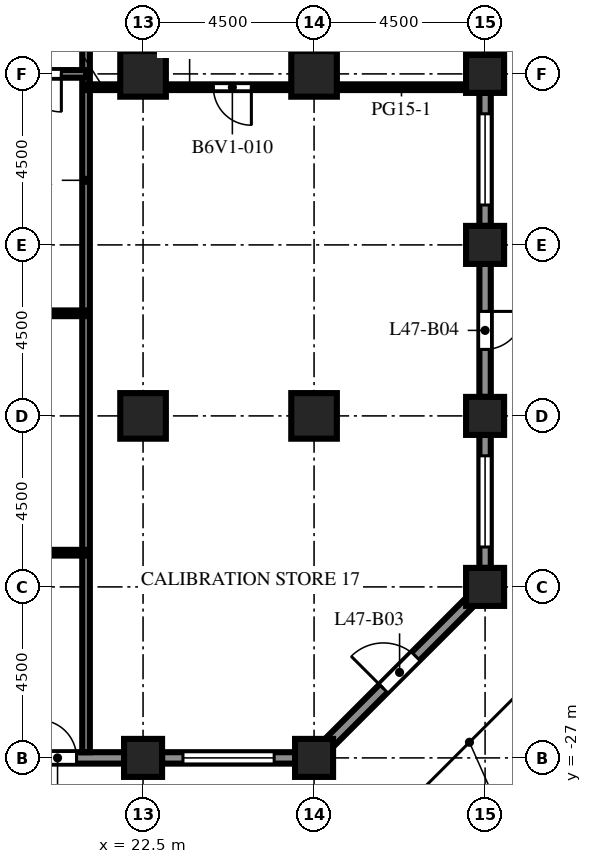
"""IFC4 building model, lengths in metres.
Left out: names, types, materials, properties, quantities, classifications, styles, units other than length and angle.
Written with IfcOpenShell. Run it as: python <this file> out.ifc"""

import sys

from ifc_helpers import new_model, si_unit, direction, frame, frame_2d, origin, origin_2d, place, context, subcontext, project, spatial, rectangle, extrude, element, fill, save


model = new_model("IFC4")
c1 = context("Model", 3, precision=1e-05, world=origin(), true_north=direction((0.0, 1.0)))
c2 = subcontext(c1, "Body", "Model", "MODEL_VIEW")
j1 = project(units=[si_unit("LENGTHUNIT", "METRE"), si_unit("PLANEANGLEUNIT", "RADIAN")], contexts=[c1])
p1 = place(None, origin())
s1 = spatial("IfcSite", under=j1, at=p1, CompositionType="ELEMENT")
p2 = place(p1, origin())
s2 = spatial("IfcBuilding", under=s1, at=p2, CompositionType="ELEMENT")
p3 = place(p2, frame((0.0, 0.0, 207.9)))
s3 = spatial("IfcBuildingStorey", under=s2, at=p3, CompositionType="ELEMENT", Elevation=207.9)
for number, where, z_axis, x_axis in (
    (1, (22.5, -27.0, 0.0), (0.0, 0.0, 1.0), (1.0, 0.0, 0.0)),
    (2, (27.0, -27.0, 0.0), (0.0, 0.0, 1.0), (1.0, 0.0, 0.0)),
    (3, (31.5, -22.5, 0.0), (0.0, 0.0, 1.0), (1.0, 0.0, 0.0)),
    (4, (31.5, -18.0, 0.0), (0.0, 0.0, 1.0), (1.0, 0.0, 0.0)),
    (5, (31.5, -13.5, 0.0), (0.0, 0.0, 1.0), (1.0, 0.0, 0.0)),
    (6, (31.5, -9.0, 0.0), (0.0, 0.0, 1.0), (1.0, 0.0, 0.0)),
):
    element("IfcColumn", number, at=place(p3, frame(where, z_axis=z_axis, x_axis=x_axis)), inside=s3, PredefinedType="COLUMN", context=c2, shape_type="SweptSolid", body=[
        extrude(rectangle(XDim=1.0, YDim=1.0, at=origin_2d()), origin(), (0.0, 0.0, 1.0), 4.1),
    ])
for number, where, z_axis, x_axis in (
    (7, (22.5, -18.0, 0.0), (0.0, 0.0, 1.0), (1.0, 0.0, 0.0)),
    (8, (22.5, -9.0, 0.0), (0.0, 0.0, 1.0), (1.0, 0.0, 0.0)),
    (9, (27.0, -18.0, 0.0), (0.0, 0.0, 1.0), (1.0, 0.0, 0.0)),
    (10, (27.0, -9.0, 0.0), (0.0, 0.0, 1.0), (1.0, 0.0, 0.0)),
):
    element("IfcColumn", number, at=place(p3, frame(where, z_axis=z_axis, x_axis=x_axis)), inside=s3, PredefinedType="COLUMN", context=c2, shape_type="SweptSolid", body=[
        extrude(rectangle(XDim=1.2, YDim=1.2, at=origin_2d()), origin(), (0.0, 0.0, 1.0), 4.1),
    ])
p4 = place(p3, frame((22.0, -27.0, 0.0), z_axis=(0.0, 0.0, 1.0), x_axis=(-1.0, 0.0, 0.0)))
e11 = element("IfcWall", 11, at=p4, inside=s3, PredefinedType="SOLIDWALL", context=c2, shape_type="SweptSolid", body=[
    extrude(rectangle(XDim=3.5, YDim=0.3, at=frame_2d((1.75, 0.0))), origin(), (0.0, 0.0, 1.0), 2.85),
])
p5 = place(p4, frame((1.25, 0.0, 0.0)))
e12 = element("IfcOpeningElement", 12, at=p5, cuts=e11, PredefinedType="OPENING", context=c2, shape_type="SweptSolid", body=[
    extrude(rectangle(XDim=1.0, YDim=2.2, at=frame_2d((0.5, 1.1))), frame((0.0, 0.16, 0.0), z_axis=(0.0, -1.0, 0.0), x_axis=(1.0, 0.0, 0.0)), (0.0, 0.0, 1.0), 0.32),
])
p6 = place(p3, frame((26.5, -27.0, 0.0), z_axis=(0.0, 0.0, 1.0), x_axis=(-1.0, 0.0, 0.0)))
e13 = element("IfcWall", 13, at=p6, inside=s3, PredefinedType="SOLIDWALL", context=c2, shape_type="SweptSolid", body=[
    extrude(rectangle(XDim=3.5, YDim=0.3, at=frame_2d((1.75, 0.0))), origin(), (0.0, 0.0, 1.0), 2.85),
])
p7 = place(p6, frame((0.55, 0.0, 0.8)))
e14 = element("IfcOpeningElement", 14, at=p7, cuts=e13, PredefinedType="OPENING", context=c2, shape_type="SweptSolid", body=[
    extrude(rectangle(XDim=2.4, YDim=1.7, at=frame_2d((1.2, 0.85))), frame((0.0, 0.16, 0.0), z_axis=(0.0, -1.0, 0.0), x_axis=(1.0, 0.0, 0.0)), (0.0, 0.0, 1.0), 0.32),
])
p8 = place(p3, frame((31.106, -22.894, 0.0), z_axis=(0.0, 0.0, 1.0), x_axis=(-0.707106781187, -0.707106781187, 0.0)))
e15 = element("IfcWall", 15, at=p8, inside=s3, PredefinedType="SOLIDWALL", context=c2, shape_type="SweptSolid", body=[
    extrude(rectangle(XDim=5.25, YDim=0.3, at=frame_2d((2.625, 0.0))), origin(), (0.0, 0.0, 1.0), 2.85),
])
p9 = place(p8, frame((2.025, 0.0, 0.0)))
e16 = element("IfcOpeningElement", 16, at=p9, cuts=e15, PredefinedType="OPENING", context=c2, shape_type="SweptSolid", body=[
    extrude(rectangle(XDim=1.2, YDim=2.2, at=frame_2d((0.6, 1.1))), frame((0.0, 0.16, 0.0), z_axis=(0.0, -1.0, 0.0), x_axis=(1.0, 0.0, 0.0)), (0.0, 0.0, 1.0), 0.32),
])
p10 = place(p3, frame((31.5, -18.5, 0.0), z_axis=(0.0, 0.0, 1.0), x_axis=(0.0, -1.0, 0.0)))
e17 = element("IfcWall", 17, at=p10, inside=s3, PredefinedType="SOLIDWALL", context=c2, shape_type="SweptSolid", body=[
    extrude(rectangle(XDim=3.5, YDim=0.3, at=frame_2d((1.75, 0.0))), origin(), (0.0, 0.0, 1.0), 2.85),
])
p11 = place(p10, frame((0.55, 0.0, 0.8)))
e18 = element("IfcOpeningElement", 18, at=p11, cuts=e17, PredefinedType="OPENING", context=c2, shape_type="SweptSolid", body=[
    extrude(rectangle(XDim=2.4, YDim=1.7, at=frame_2d((1.2, 0.85))), frame((0.0, 0.16, 0.0), z_axis=(0.0, -1.0, 0.0), x_axis=(1.0, 0.0, 0.0)), (0.0, 0.0, 1.0), 0.32),
])
p12 = place(p3, frame((31.5, -14.0, 0.0), z_axis=(0.0, 0.0, 1.0), x_axis=(0.0, -1.0, 0.0)))
e19 = element("IfcWall", 19, at=p12, inside=s3, PredefinedType="SOLIDWALL", context=c2, shape_type="SweptSolid", body=[
    extrude(rectangle(XDim=3.5, YDim=0.3, at=frame_2d((1.75, 0.0))), origin(), (0.0, 0.0, 1.0), 2.85),
])
p13 = place(p12, frame((1.25, 0.0, 0.0)))
e20 = element("IfcOpeningElement", 20, at=p13, cuts=e19, PredefinedType="OPENING", context=c2, shape_type="SweptSolid", body=[
    extrude(rectangle(XDim=1.0, YDim=2.2, at=frame_2d((0.5, 1.1))), frame((0.0, 0.16, 0.0), z_axis=(0.0, -1.0, 0.0), x_axis=(1.0, 0.0, 0.0)), (0.0, 0.0, 1.0), 0.32),
])
p14 = place(p3, frame((31.5, -9.5, 0.0), z_axis=(0.0, 0.0, 1.0), x_axis=(0.0, -1.0, 0.0)))
e21 = element("IfcWall", 21, at=p14, inside=s3, PredefinedType="SOLIDWALL", context=c2, shape_type="SweptSolid", body=[
    extrude(rectangle(XDim=3.5, YDim=0.3, at=frame_2d((1.75, 0.0))), origin(), (0.0, 0.0, 1.0), 2.85),
])
p15 = place(p14, frame((0.55, 0.0, 0.8)))
e22 = element("IfcOpeningElement", 22, at=p15, cuts=e21, PredefinedType="OPENING", context=c2, shape_type="SweptSolid", body=[
    extrude(rectangle(XDim=2.4, YDim=1.7, at=frame_2d((1.2, 0.85))), frame((0.0, 0.16, 0.0), z_axis=(0.0, -1.0, 0.0), x_axis=(1.0, 0.0, 0.0)), (0.0, 0.0, 1.0), 0.32),
])
p16 = place(p3, frame((31.5, -5.0, 0.0), z_axis=(0.0, 0.0, 1.0), x_axis=(0.0, -1.0, 0.0)))
e23 = element("IfcWall", 23, at=p16, inside=s3, PredefinedType="SOLIDWALL", context=c2, shape_type="SweptSolid", body=[
    extrude(rectangle(XDim=3.5, YDim=0.3, at=frame_2d((1.75, 0.0))), origin(), (0.0, 0.0, 1.0), 2.85),
])
p17 = place(p16, frame((0.55, 0.0, 0.8)))
e24 = element("IfcOpeningElement", 24, at=p17, cuts=e23, PredefinedType="OPENING", context=c2, shape_type="SweptSolid", body=[
    extrude(rectangle(XDim=2.4, YDim=1.7, at=frame_2d((1.2, 0.85))), frame((0.0, 0.16, 0.0), z_axis=(0.0, -1.0, 0.0), x_axis=(1.0, 0.0, 0.0)), (0.0, 0.0, 1.0), 0.32),
])
p18 = place(p3, frame((21.0, -26.85, 0.0), z_axis=(0.0, 0.0, 1.0), x_axis=(0.0, 1.0, 0.0)))
e25 = element("IfcWall", 25, at=p18, inside=s3, PredefinedType="PARTITIONING", context=c2, shape_type="SweptSolid", body=[
    extrude(rectangle(XDim=30.1, YDim=0.2, at=frame_2d((15.05, 0.0))), origin(), (0.0, 0.0, 1.0), 3.65),
])
p19 = place(p3, frame((21.0, -21.6, 0.0), z_axis=(0.0, 0.0, 1.0), x_axis=(-1.0, 0.0, 0.0)))
e26 = element("IfcWall", 26, at=p19, inside=s3, PredefinedType="PARTITIONING", context=c2, shape_type="SweptSolid", body=[
    extrude(rectangle(XDim=34.5, YDim=0.15, at=frame_2d((17.25, 0.0))), origin(), (0.0, 0.0, 1.0), 3.65),
])
p20 = place(p19, frame((29.9, 0.0, 0.0)))
e27 = element("IfcOpeningElement", 27, at=p20, cuts=e26, PredefinedType="OPENING", context=c2, shape_type="SweptSolid", body=[
    extrude(rectangle(XDim=1.0, YDim=2.1, at=frame_2d((0.5, 1.05))), frame((0.0, 0.085, 0.0), z_axis=(0.0, -1.0, 0.0), x_axis=(1.0, 0.0, 0.0)), (0.0, 0.0, 1.0), 0.17),
])
p21 = place(p19, frame((21.4, 0.0, 0.0)))
e28 = element("IfcOpeningElement", 28, at=p21, cuts=e26, PredefinedType="OPENING", context=c2, shape_type="SweptSolid", body=[
    extrude(rectangle(XDim=1.0, YDim=2.1, at=frame_2d((0.5, 1.05))), frame((0.0, 0.085, 0.0), z_axis=(0.0, -1.0, 0.0), x_axis=(1.0, 0.0, 0.0)), (0.0, 0.0, 1.0), 0.17),
])
p22 = place(p19, frame((13.15, 0.0, 0.0)))
e29 = element("IfcOpeningElement", 29, at=p22, cuts=e26, PredefinedType="OPENING", context=c2, shape_type="SweptSolid", body=[
    extrude(rectangle(XDim=1.0, YDim=2.1, at=frame_2d((0.5, 1.05))), frame((0.0, 0.085, 0.0), z_axis=(0.0, -1.0, 0.0), x_axis=(1.0, 0.0, 0.0)), (0.0, 0.0, 1.0), 0.17),
])
p23 = place(p19, frame((5.15, 0.0, 0.0)))
e30 = element("IfcOpeningElement", 30, at=p23, cuts=e26, PredefinedType="OPENING", context=c2, shape_type="SweptSolid", body=[
    extrude(rectangle(XDim=1.0, YDim=2.1, at=frame_2d((0.5, 1.05))), frame((0.0, 0.085, 0.0), z_axis=(0.0, -1.0, 0.0), x_axis=(1.0, 0.0, 0.0)), (0.0, 0.0, 1.0), 0.17),
])
p24 = place(p3, frame((21.0, -15.3, 0.0), z_axis=(0.0, 0.0, 1.0), x_axis=(-1.0, 0.0, 0.0)))
e31 = element("IfcWall", 31, at=p24, inside=s3, PredefinedType="PARTITIONING", context=c2, shape_type="SweptSolid", body=[
    extrude(rectangle(XDim=34.5, YDim=0.15, at=frame_2d((17.25, 0.0))), origin(), (0.0, 0.0, 1.0), 3.65),
])
p25 = place(p24, frame((28.9, 0.0, 0.0)))
e32 = element("IfcOpeningElement", 32, at=p25, cuts=e31, PredefinedType="OPENING", context=c2, shape_type="SweptSolid", body=[
    extrude(rectangle(XDim=1.0, YDim=2.1, at=frame_2d((0.5, 1.05))), frame((0.0, 0.085, 0.0), z_axis=(0.0, -1.0, 0.0), x_axis=(1.0, 0.0, 0.0)), (0.0, 0.0, 1.0), 0.17),
])
p26 = place(p24, frame((19.4, 0.0, 0.0)))
e33 = element("IfcOpeningElement", 33, at=p26, cuts=e31, PredefinedType="OPENING", context=c2, shape_type="SweptSolid", body=[
    extrude(rectangle(XDim=1.0, YDim=2.1, at=frame_2d((0.5, 1.05))), frame((0.0, 0.085, 0.0), z_axis=(0.0, -1.0, 0.0), x_axis=(1.0, 0.0, 0.0)), (0.0, 0.0, 1.0), 0.17),
])
p27 = place(p24, frame((14.15, 0.0, 0.0)))
e34 = element("IfcOpeningElement", 34, at=p27, cuts=e31, PredefinedType="OPENING", context=c2, shape_type="SweptSolid", body=[
    extrude(rectangle(XDim=1.0, YDim=2.1, at=frame_2d((0.5, 1.05))), frame((0.0, 0.085, 0.0), z_axis=(0.0, -1.0, 0.0), x_axis=(1.0, 0.0, 0.0)), (0.0, 0.0, 1.0), 0.17),
])
p28 = place(p24, frame((3.9, 0.0, 0.0)))
e35 = element("IfcOpeningElement", 35, at=p28, cuts=e31, PredefinedType="OPENING", context=c2, shape_type="SweptSolid", body=[
    extrude(rectangle(XDim=1.0, YDim=2.1, at=frame_2d((0.5, 1.05))), frame((0.0, 0.085, 0.0), z_axis=(0.0, -1.0, 0.0), x_axis=(1.0, 0.0, 0.0)), (0.0, 0.0, 1.0), 0.17),
])
p29 = place(p3, frame((21.0, -9.35, 0.0), z_axis=(0.0, 0.0, 1.0), x_axis=(1.0, 0.0, 0.0)))
e36 = element("IfcWall", 36, at=p29, inside=s3, PredefinedType="PARTITIONING", context=c2, shape_type="SweptSolid", body=[
    extrude(rectangle(XDim=0.9, YDim=0.15, at=frame_2d((0.45, 0.0))), origin(), (0.0, 0.0, 1.0), 3.65),
])
p30 = place(p3, frame((26.4, -9.35, 0.0), z_axis=(0.0, 0.0, 1.0), x_axis=(-1.0, 0.0, 0.0)))
e37 = element("IfcWall", 37, at=p30, inside=s3, PredefinedType="PARTITIONING", context=c2, shape_type="SweptSolid", body=[
    extrude(rectangle(XDim=3.3, YDim=0.15, at=frame_2d((1.65, 0.0))), origin(), (0.0, 0.0, 1.0), 3.65),
])
p31 = place(p30, frame((1.05, 0.0, 0.0)))
e38 = element("IfcOpeningElement", 38, at=p31, cuts=e37, PredefinedType="OPENING", context=c2, shape_type="SweptSolid", body=[
    extrude(rectangle(XDim=1.0, YDim=2.1, at=frame_2d((0.5, 1.05))), frame((0.0, 0.085, 0.0), z_axis=(0.0, -1.0, 0.0), x_axis=(1.0, 0.0, 0.0)), (0.0, 0.0, 1.0), 0.17),
])
p32 = place(p3, frame((27.6, -9.35, 0.0), z_axis=(0.0, 0.0, 1.0), x_axis=(1.0, 0.0, 0.0)))
e39 = element("IfcWall", 39, at=p32, inside=s3, PredefinedType="PARTITIONING", context=c2, shape_type="SweptSolid", body=[
    extrude(rectangle(XDim=3.4, YDim=0.15, at=frame_2d((1.7, 0.0))), origin(), (0.0, 0.0, 1.0), 3.65),
])
p33 = place(p3, frame((21.0, -9.0, 0.0), z_axis=(0.0, 0.0, 1.0), x_axis=(-1.0, 0.0, 0.0)))
e40 = element("IfcWall", 40, at=p33, inside=s3, PredefinedType="PARTITIONING", context=c2, shape_type="SweptSolid", body=[
    extrude(rectangle(XDim=3.0, YDim=0.2, at=frame_2d((1.5, 0.0))), origin(), (0.0, 0.0, 1.0), 3.65),
])
p34 = place(p33, frame((0.65, 0.0, 0.0)))
e41 = element("IfcOpeningElement", 41, at=p34, cuts=e40, PredefinedType="OPENING", context=c2, shape_type="SweptSolid", body=[
    extrude(rectangle(XDim=1.0, YDim=2.1, at=frame_2d((0.5, 1.05))), frame((0.0, 0.11, 0.0), z_axis=(0.0, -1.0, 0.0), x_axis=(1.0, 0.0, 0.0)), (0.0, 0.0, 1.0), 0.22),
])
p35 = place(p5, origin())
e42 = element("IfcDoor", 42, at=p35, inside=s3, OperationType="SINGLE_SWING_RIGHT", PredefinedType="DOOR", context=c2, shape_type="SweptSolid", body=[
    extrude(rectangle(XDim=1.0, YDim=2.2, at=frame_2d((0.5, 1.1))), frame((0.0, 0.025, 0.0), z_axis=(0.0, -1.0, 0.0), x_axis=(1.0, 0.0, 0.0)), (0.0, 0.0, 1.0), 0.05),
])
fill(e12, e42)
p36 = place(p7, origin())
e43 = element("IfcWindow", 43, at=p36, inside=s3, PartitioningType="SINGLE_PANEL", PredefinedType="WINDOW", context=c2, shape_type="SweptSolid", body=[
    extrude(rectangle(XDim=2.4, YDim=1.7, at=frame_2d((1.2, 0.85))), frame((0.0, 0.03, 0.0), z_axis=(0.0, -1.0, 0.0), x_axis=(1.0, 0.0, 0.0)), (0.0, 0.0, 1.0), 0.06),
])
fill(e14, e43)
p37 = place(p9, origin())
e44 = element("IfcDoor", 44, at=p37, inside=s3, OperationType="SINGLE_SWING_RIGHT", PredefinedType="DOOR", context=c2, shape_type="SweptSolid", body=[
    extrude(rectangle(XDim=1.2, YDim=2.2, at=frame_2d((0.6, 1.1))), frame((0.0, 0.025, 0.0), z_axis=(0.0, -1.0, 0.0), x_axis=(1.0, 0.0, 0.0)), (0.0, 0.0, 1.0), 0.05),
])
fill(e16, e44)
p38 = place(p11, origin())
e45 = element("IfcWindow", 45, at=p38, inside=s3, PartitioningType="SINGLE_PANEL", PredefinedType="WINDOW", context=c2, shape_type="SweptSolid", body=[
    extrude(rectangle(XDim=2.4, YDim=1.7, at=frame_2d((1.2, 0.85))), frame((0.0, 0.03, 0.0), z_axis=(0.0, -1.0, 0.0), x_axis=(1.0, 0.0, 0.0)), (0.0, 0.0, 1.0), 0.06),
])
fill(e18, e45)
p39 = place(p13, origin())
e46 = element("IfcDoor", 46, at=p39, inside=s3, OperationType="SINGLE_SWING_LEFT", PredefinedType="DOOR", context=c2, shape_type="SweptSolid", body=[
    extrude(rectangle(XDim=1.0, YDim=2.2, at=frame_2d((0.5, 1.1))), frame((0.0, 0.025, 0.0), z_axis=(0.0, -1.0, 0.0), x_axis=(1.0, 0.0, 0.0)), (0.0, 0.0, 1.0), 0.05),
])
fill(e20, e46)
p40 = place(p15, origin())
e47 = element("IfcWindow", 47, at=p40, inside=s3, PartitioningType="SINGLE_PANEL", PredefinedType="WINDOW", context=c2, shape_type="SweptSolid", body=[
    extrude(rectangle(XDim=2.4, YDim=1.7, at=frame_2d((1.2, 0.85))), frame((0.0, 0.03, 0.0), z_axis=(0.0, -1.0, 0.0), x_axis=(1.0, 0.0, 0.0)), (0.0, 0.0, 1.0), 0.06),
])
fill(e22, e47)
p41 = place(p31, origin())
e48 = element("IfcDoor", 48, at=p41, inside=s3, OperationType="SINGLE_SWING_LEFT", PredefinedType="DOOR", context=c2, shape_type="SweptSolid", body=[
    extrude(rectangle(XDim=1.0, YDim=2.1, at=frame_2d((0.5, 1.05))), frame((0.0, 0.025, 0.0), z_axis=(0.0, -1.0, 0.0), x_axis=(1.0, 0.0, 0.0)), (0.0, 0.0, 1.0), 0.05),
])
fill(e38, e48)
p42 = place(p34, origin())
e49 = element("IfcDoor", 49, at=p42, inside=s3, OperationType="SINGLE_SWING_LEFT", PredefinedType="DOOR", context=c2, shape_type="SweptSolid", body=[
    extrude(rectangle(XDim=1.0, YDim=2.1, at=frame_2d((0.5, 1.05))), frame((0.0, 0.025, 0.0), z_axis=(0.0, -1.0, 0.0), x_axis=(1.0, 0.0, 0.0)), (0.0, 0.0, 1.0), 0.05),
])
fill(e41, e49)
save(model, sys.argv[1])
